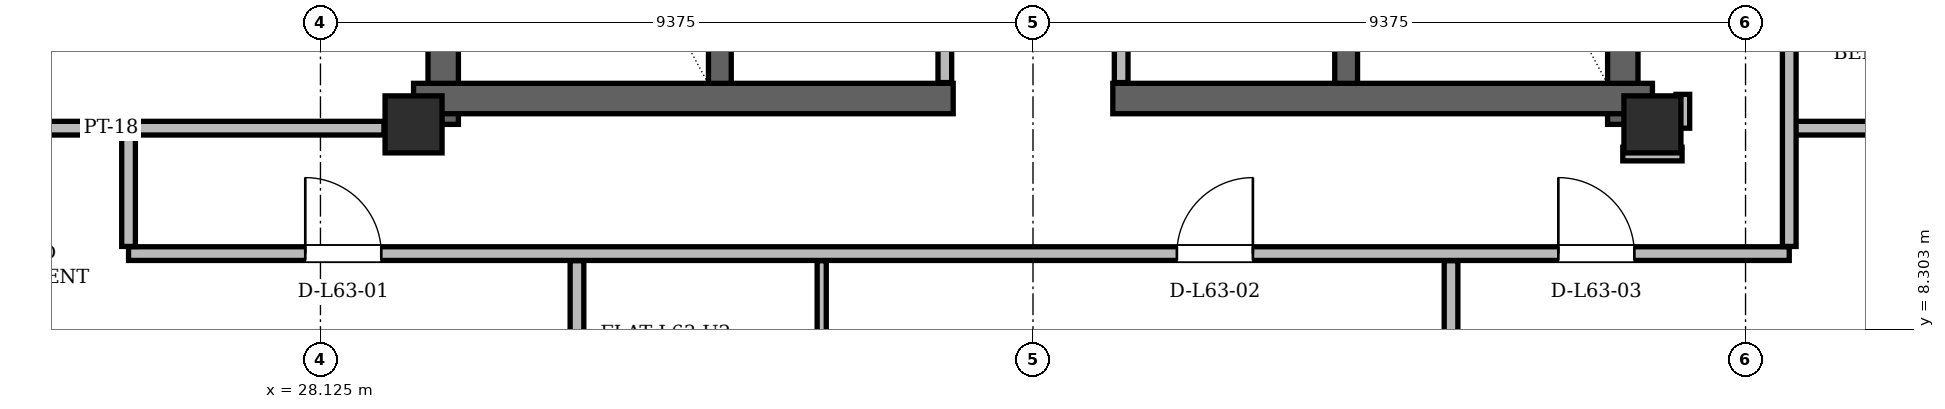
"""IFC4 building model, lengths in metres.
Left out: names, types, materials, properties, quantities, classifications, styles, units other than length and angle.
Written with IfcOpenShell. Run it as: python <this file> out.ifc"""

import sys

from ifc_helpers import new_model, si_unit, direction, frame, frame_2d, origin, origin_2d, place, context, subcontext, project, spatial, rectangle, hollow_rectangle, extrude, element, fill, save


model = new_model("IFC4")
c1 = context("Model", 3, precision=1e-05, world=origin(), true_north=direction((0.0, 1.0)))
c2 = subcontext(c1, "Body", "Model", "MODEL_VIEW")
j1 = project(units=[si_unit("LENGTHUNIT", "METRE"), si_unit("PLANEANGLEUNIT", "RADIAN")], contexts=[c1])
p1 = place(None, origin())
s1 = spatial("IfcSite", under=j1, at=p1, CompositionType="ELEMENT")
p2 = place(p1, origin())
s2 = spatial("IfcBuilding", under=s1, at=p2, CompositionType="ELEMENT")
p3 = place(p2, frame((0.0, 0.0, 237.9)))
s3 = spatial("IfcBuildingStorey", under=s2, at=p3, CompositionType="ELEMENT", Elevation=237.9)
for number, where, z_axis, x_axis in (
    (1, (29.35, 11.0, 0.0), (0.0, 0.0, 1.0), (1.0, 0.0, 0.0)),
    (2, (45.65, 11.0, 0.0), (0.0, 0.0, 1.0), (1.0, 0.0, 0.0)),
):
    element("IfcColumn", number, at=place(p3, frame(where, z_axis=z_axis, x_axis=x_axis)), inside=s3, PredefinedType="COLUMN", context=c2, shape_type="SweptSolid", body=[
        extrude(hollow_rectangle(XDim=0.75, YDim=0.75, WallThickness=0.06, at=origin_2d()), origin(), (0.0, 0.0, 1.0), 3.6),
    ])
for number, where, z_axis, x_axis in (
    (3, (29.74, 11.0, 0.0), (0.0, 0.0, 1.0), (0.0, 1.0, 0.0)),
    (4, (45.26, 11.0, 0.0), (0.0, 0.0, 1.0), (0.0, 1.0, 0.0)),
):
    element("IfcWall", number, at=place(p3, frame(where, z_axis=z_axis, x_axis=x_axis)), inside=s3, PredefinedType="SHEAR", context=c2, shape_type="SweptSolid", body=[
        extrude(rectangle(XDim=13.3, YDim=0.4, at=frame_2d((6.65, 0.0))), origin(), (0.0, 0.0, 1.0), 3.38),
    ])
for number, where, z_axis, x_axis in (
    (5, (29.35, 11.34, 0.0), (0.0, 0.0, 1.0), (1.0, 0.0, 0.0)),
    (6, (38.55, 11.34, 0.0), (0.0, 0.0, 1.0), (1.0, 0.0, 0.0)),
):
    element("IfcWall", number, at=place(p3, frame(where, z_axis=z_axis, x_axis=x_axis)), inside=s3, PredefinedType="SHEAR", context=c2, shape_type="SweptSolid", body=[
        extrude(rectangle(XDim=7.1, YDim=0.4, at=frame_2d((3.55, 0.0))), origin(), (0.0, 0.0, 1.0), 3.38),
    ])
for number, where, z_axis, x_axis in (
    (7, (33.38, 11.54, 0.0), (0.0, 0.0, 1.0), (0.0, 1.0, 0.0)),
    (8, (41.62, 11.54, 0.0), (0.0, 0.0, 1.0), (0.0, 1.0, 0.0)),
):
    element("IfcWall", number, at=place(p3, frame(where, z_axis=z_axis, x_axis=x_axis)), inside=s3, PredefinedType="SHEAR", context=c2, shape_type="SweptSolid", body=[
        extrude(rectangle(XDim=7.62, YDim=0.3, at=frame_2d((3.81, 0.0))), origin(), (0.0, 0.0, 1.0), 3.38),
    ])
p4 = place(p3, frame((58.899, 11.151, 0.0), z_axis=(0.0, 0.0, 1.0), x_axis=(-0.500002325133, 0.866024061364, 0.0)))
e9 = element("IfcWall", 9, at=p4, inside=s3, PredefinedType="SOLIDWALL", context=c2, shape_type="SweptSolid", body=[
    extrude(rectangle(XDim=36.9, YDim=0.29, at=frame_2d((18.45, 0.0))), origin(), (0.0, 0.0, 1.0), 2.677),
])
p5 = place(p4, frame((3.429, 0.0, 0.0)))
e10 = element("IfcOpeningElement", 10, at=p5, cuts=e9, PredefinedType="OPENING", context=c2, shape_type="SweptSolid", body=[
    extrude(rectangle(XDim=1.5, YDim=2.2, at=frame_2d((0.75, 1.1))), frame((0.0, 0.145, 0.0), z_axis=(0.0, -1.0, 0.0), x_axis=(1.0, 0.0, 0.0)), (0.0, 0.0, 1.0), 0.29),
])
p6 = place(p4, frame((27.156, 0.0, 0.0)))
e11 = element("IfcOpeningElement", 11, at=p6, cuts=e9, PredefinedType="OPENING", context=c2, shape_type="SweptSolid", body=[
    extrude(rectangle(XDim=1.5, YDim=2.2, at=frame_2d((0.75, 1.1))), frame((0.0, 0.145, 0.0), z_axis=(0.0, -1.0, 0.0), x_axis=(1.0, 0.0, 0.0)), (0.0, 0.0, 1.0), 0.29),
])
p7 = place(p4, frame((6.97, 0.0, 0.85)))
e12 = element("IfcOpeningElement", 12, at=p7, cuts=e9, PredefinedType="OPENING", context=c2, shape_type="SweptSolid", body=[
    extrude(rectangle(XDim=1.6, YDim=1.7, at=frame_2d((0.8, 0.85))), frame((0.0, 0.145, 0.0), z_axis=(0.0, -1.0, 0.0), x_axis=(1.0, 0.0, 0.0)), (0.0, 0.0, 1.0), 0.29),
])
p8 = place(p4, frame((1.106, 0.0, 0.85)))
e13 = element("IfcOpeningElement", 13, at=p8, cuts=e9, PredefinedType="OPENING", context=c2, shape_type="SweptSolid", body=[
    extrude(rectangle(XDim=1.6, YDim=1.7, at=frame_2d((0.8, 0.85))), frame((0.0, 0.145, 0.0), z_axis=(0.0, -1.0, 0.0), x_axis=(1.0, 0.0, 0.0)), (0.0, 0.0, 1.0), 0.29),
])
p9 = place(p4, frame((34.697, 0.0, 0.85)))
e14 = element("IfcOpeningElement", 14, at=p9, cuts=e9, PredefinedType="OPENING", context=c2, shape_type="SweptSolid", body=[
    extrude(rectangle(XDim=1.2, YDim=1.48, at=frame_2d((0.6, 0.74))), frame((0.0, 0.145, 0.0), z_axis=(0.0, -1.0, 0.0), x_axis=(1.0, 0.0, 0.0)), (0.0, 0.0, 1.0), 0.29),
])
p10 = place(p4, frame((16.774, 0.0, 0.85)))
e15 = element("IfcOpeningElement", 15, at=p10, cuts=e9, PredefinedType="OPENING", context=c2, shape_type="SweptSolid", body=[
    extrude(rectangle(XDim=2.2, YDim=1.717, at=frame_2d((1.1, 0.858))), frame((0.0, 0.145, 0.0), z_axis=(0.0, -1.0, 0.0), x_axis=(1.0, 0.0, 0.0)), (0.0, 0.0, 1.0), 0.29),
])
p11 = place(p4, frame((22.799, 0.0, 0.85)))
e16 = element("IfcOpeningElement", 16, at=p11, cuts=e9, PredefinedType="OPENING", context=c2, shape_type="SweptSolid", body=[
    extrude(rectangle(XDim=1.6, YDim=1.7, at=frame_2d((0.8, 0.85))), frame((0.0, 0.145, 0.0), z_axis=(0.0, -1.0, 0.0), x_axis=(1.0, 0.0, 0.0)), (0.0, 0.0, 1.0), 0.29),
])
p12 = place(p4, frame((29.059, 0.0, 0.85)))
e17 = element("IfcOpeningElement", 17, at=p12, cuts=e9, PredefinedType="OPENING", context=c2, shape_type="SweptSolid", body=[
    extrude(rectangle(XDim=1.2, YDim=1.48, at=frame_2d((0.6, 0.74))), frame((0.0, 0.145, 0.0), z_axis=(0.0, -1.0, 0.0), x_axis=(1.0, 0.0, 0.0)), (0.0, 0.0, 1.0), 0.29),
])
p13 = place(p4, frame((31.635, 0.0, 0.85)))
e18 = element("IfcOpeningElement", 18, at=p13, cuts=e9, PredefinedType="OPENING", context=c2, shape_type="SweptSolid", body=[
    extrude(rectangle(XDim=1.2, YDim=1.48, at=frame_2d((0.6, 0.74))), frame((0.0, 0.145, 0.0), z_axis=(0.0, -1.0, 0.0), x_axis=(1.0, 0.0, 0.0)), (0.0, 0.0, 1.0), 0.29),
])
p14 = place(p4, frame((12.419, 0.0, 0.85)))
e19 = element("IfcOpeningElement", 19, at=p14, cuts=e9, PredefinedType="OPENING", context=c2, shape_type="SweptSolid", body=[
    extrude(rectangle(XDim=1.2, YDim=1.48, at=frame_2d((0.6, 0.74))), frame((0.0, 0.145, 0.0), z_axis=(0.0, -1.0, 0.0), x_axis=(1.0, 0.0, 0.0)), (0.0, 0.0, 1.0), 0.29),
])
p15 = place(p3, frame((34.551, 43.107, 0.0), z_axis=(0.0, 0.0, 1.0), x_axis=(-0.500002325133, -0.866024061364, 0.0)))
e20 = element("IfcWall", 20, at=p15, inside=s3, PredefinedType="SOLIDWALL", context=c2, shape_type="SweptSolid", body=[
    extrude(rectangle(XDim=36.9, YDim=0.29, at=frame_2d((18.45, 0.0))), origin(), (0.0, 0.0, 1.0), 2.677),
])
p16 = place(p15, frame((3.429, 0.0, 0.0)))
e21 = element("IfcOpeningElement", 21, at=p16, cuts=e20, PredefinedType="OPENING", context=c2, shape_type="SweptSolid", body=[
    extrude(rectangle(XDim=1.5, YDim=2.2, at=frame_2d((0.75, 1.1))), frame((0.0, 0.145, 0.0), z_axis=(0.0, -1.0, 0.0), x_axis=(1.0, 0.0, 0.0)), (0.0, 0.0, 1.0), 0.29),
])
p17 = place(p15, frame((28.625, 0.0, 0.0)))
e22 = element("IfcOpeningElement", 22, at=p17, cuts=e20, PredefinedType="OPENING", context=c2, shape_type="SweptSolid", body=[
    extrude(rectangle(XDim=1.5, YDim=2.2, at=frame_2d((0.75, 1.1))), frame((0.0, 0.145, 0.0), z_axis=(0.0, -1.0, 0.0), x_axis=(1.0, 0.0, 0.0)), (0.0, 0.0, 1.0), 0.29),
])
p18 = place(p15, frame((21.887, 0.0, 0.85)))
e23 = element("IfcOpeningElement", 23, at=p18, cuts=e20, PredefinedType="OPENING", context=c2, shape_type="SweptSolid", body=[
    extrude(rectangle(XDim=2.4, YDim=1.717, at=frame_2d((1.2, 0.858))), frame((0.0, 0.145, 0.0), z_axis=(0.0, -1.0, 0.0), x_axis=(1.0, 0.0, 0.0)), (0.0, 0.0, 1.0), 0.29),
])
p19 = place(p15, frame((34.716, 0.0, 0.85)))
e24 = element("IfcOpeningElement", 24, at=p19, cuts=e20, PredefinedType="OPENING", context=c2, shape_type="SweptSolid", body=[
    extrude(rectangle(XDim=1.2, YDim=1.48, at=frame_2d((0.6, 0.74))), frame((0.0, 0.145, 0.0), z_axis=(0.0, -1.0, 0.0), x_axis=(1.0, 0.0, 0.0)), (0.0, 0.0, 1.0), 0.29),
])
p20 = place(p15, frame((32.59, 0.0, 0.85)))
e25 = element("IfcOpeningElement", 25, at=p20, cuts=e20, PredefinedType="OPENING", context=c2, shape_type="SweptSolid", body=[
    extrude(rectangle(XDim=1.2, YDim=1.48, at=frame_2d((0.6, 0.74))), frame((0.0, 0.145, 0.0), z_axis=(0.0, -1.0, 0.0), x_axis=(1.0, 0.0, 0.0)), (0.0, 0.0, 1.0), 0.29),
])
p21 = place(p15, frame((12.187, 0.0, 0.85)))
e26 = element("IfcOpeningElement", 26, at=p21, cuts=e20, PredefinedType="OPENING", context=c2, shape_type="SweptSolid", body=[
    extrude(rectangle(XDim=1.2, YDim=1.48, at=frame_2d((0.6, 0.74))), frame((0.0, 0.145, 0.0), z_axis=(0.0, -1.0, 0.0), x_axis=(1.0, 0.0, 0.0)), (0.0, 0.0, 1.0), 0.29),
])
p22 = place(p15, frame((16.565, 0.0, 0.85)))
e27 = element("IfcOpeningElement", 27, at=p22, cuts=e20, PredefinedType="OPENING", context=c2, shape_type="SweptSolid", body=[
    extrude(rectangle(XDim=2.0, YDim=1.717, at=frame_2d((1.0, 0.858))), frame((0.0, 0.145, 0.0), z_axis=(0.0, -1.0, 0.0), x_axis=(1.0, 0.0, 0.0)), (0.0, 0.0, 1.0), 0.29),
])
p23 = place(p15, frame((6.94, 0.0, 0.85)))
e28 = element("IfcOpeningElement", 28, at=p23, cuts=e20, PredefinedType="OPENING", context=c2, shape_type="SweptSolid", body=[
    extrude(rectangle(XDim=1.2, YDim=1.48, at=frame_2d((0.6, 0.74))), frame((0.0, 0.145, 0.0), z_axis=(0.0, -1.0, 0.0), x_axis=(1.0, 0.0, 0.0)), (0.0, 0.0, 1.0), 0.29),
])
p24 = place(p3, frame((36.34, 11.55, 0.0), z_axis=(0.0, 0.0, 1.0), x_axis=(0.0, 1.0, 0.0)))
e29 = element("IfcWall", 29, at=p24, inside=s3, PredefinedType="PARTITIONING", context=c2, shape_type="SweptSolid", body=[
    extrude(rectangle(XDim=5.55, YDim=0.18, at=frame_2d((2.775, 0.0))), origin(), (0.0, 0.0, 1.0), 3.38),
])
p25 = place(p24, frame((0.55, 0.0, 0.0)))
e30 = element("IfcOpeningElement", 30, at=p25, cuts=e29, PredefinedType="OPENING", context=c2, shape_type="SweptSolid", body=[
    extrude(rectangle(XDim=0.88, YDim=2.08, at=frame_2d((0.44, 1.04))), frame((0.0, 0.09, 0.0), z_axis=(0.0, -1.0, 0.0), x_axis=(1.0, 0.0, 0.0)), (0.0, 0.0, 1.0), 0.18),
])
p26 = place(p24, frame((3.25, 0.0, 0.0)))
e31 = element("IfcOpeningElement", 31, at=p26, cuts=e29, PredefinedType="OPENING", context=c2, shape_type="SweptSolid", body=[
    extrude(rectangle(XDim=0.88, YDim=2.08, at=frame_2d((0.44, 1.04))), frame((0.0, 0.09, 0.0), z_axis=(0.0, -1.0, 0.0), x_axis=(1.0, 0.0, 0.0)), (0.0, 0.0, 1.0), 0.18),
])
p27 = place(p3, frame((38.66, 11.55, 0.0), z_axis=(0.0, 0.0, 1.0), x_axis=(0.0, 1.0, 0.0)))
e32 = element("IfcWall", 32, at=p27, inside=s3, PredefinedType="PARTITIONING", context=c2, shape_type="SweptSolid", body=[
    extrude(rectangle(XDim=5.55, YDim=0.18, at=frame_2d((2.775, 0.0))), origin(), (0.0, 0.0, 1.0), 3.38),
])
p28 = place(p27, frame((1.35, 0.0, 0.0)))
e33 = element("IfcOpeningElement", 33, at=p28, cuts=e32, PredefinedType="OPENING", context=c2, shape_type="SweptSolid", body=[
    extrude(rectangle(XDim=0.88, YDim=2.08, at=frame_2d((0.44, 1.04))), frame((0.0, 0.09, 0.0), z_axis=(0.0, -1.0, 0.0), x_axis=(1.0, 0.0, 0.0)), (0.0, 0.0, 1.0), 0.18),
])
p29 = place(p27, frame((4.1, 0.0, 0.0)))
e34 = element("IfcOpeningElement", 34, at=p29, cuts=e32, PredefinedType="OPENING", context=c2, shape_type="SweptSolid", body=[
    extrude(rectangle(XDim=0.88, YDim=2.08, at=frame_2d((0.44, 1.04))), frame((0.0, 0.09, 0.0), z_axis=(0.0, -1.0, 0.0), x_axis=(1.0, 0.0, 0.0)), (0.0, 0.0, 1.0), 0.18),
])
p30 = place(p3, frame((25.6, 9.3, 0.0), z_axis=(0.0, 0.0, 1.0), x_axis=(1.0, 0.0, 0.0)))
e35 = element("IfcWall", 35, at=p30, inside=s3, PredefinedType="PARTITIONING", context=c2, shape_type="SweptSolid", body=[
    extrude(rectangle(XDim=21.85, YDim=0.18, at=frame_2d((10.925, 0.0))), origin(), (0.0, 0.0, 1.0), 2.913),
])
p31 = place(p30, frame((2.325, 0.0, 0.0)))
e36 = element("IfcOpeningElement", 36, at=p31, cuts=e35, PredefinedType="OPENING", context=c2, shape_type="SweptSolid", body=[
    extrude(rectangle(XDim=1.0, YDim=2.18, at=frame_2d((0.5, 1.09))), frame((0.0, 0.09, 0.0), z_axis=(0.0, -1.0, 0.0), x_axis=(1.0, 0.0, 0.0)), (0.0, 0.0, 1.0), 0.18),
])
p32 = place(p30, frame((13.793, 0.0, 0.0)))
e37 = element("IfcOpeningElement", 37, at=p32, cuts=e35, PredefinedType="OPENING", context=c2, shape_type="SweptSolid", body=[
    extrude(rectangle(XDim=1.0, YDim=2.18, at=frame_2d((0.5, 1.09))), frame((0.0, 0.09, 0.0), z_axis=(0.0, -1.0, 0.0), x_axis=(1.0, 0.0, 0.0)), (0.0, 0.0, 1.0), 0.18),
])
p33 = place(p30, frame((18.812, 0.0, 0.0)))
e38 = element("IfcOpeningElement", 38, at=p33, cuts=e35, PredefinedType="OPENING", context=c2, shape_type="SweptSolid", body=[
    extrude(rectangle(XDim=1.0, YDim=2.18, at=frame_2d((0.5, 1.09))), frame((0.0, 0.09, 0.0), z_axis=(0.0, -1.0, 0.0), x_axis=(1.0, 0.0, 0.0)), (0.0, 0.0, 1.0), 0.18),
])
p34 = place(p3, frame((45.26, 10.61, 0.0), z_axis=(0.0, 0.0, 1.0), x_axis=(1.0, 0.0, 0.0)))
e39 = element("IfcWall", 39, at=p34, inside=s3, PredefinedType="PARTITIONING", context=c2, shape_type="SweptSolid", body=[
    extrude(rectangle(XDim=0.78, YDim=0.18, at=frame_2d((0.39, 0.0))), origin(), (0.0, 0.0, 1.0), 3.38),
])
p35 = place(p3, frame((16.487, 10.95, 0.0), z_axis=(0.0, 0.0, 1.0), x_axis=(1.0, 0.0, 0.0)))
e40 = element("IfcWall", 40, at=p35, inside=s3, PredefinedType="PARTITIONING", context=c2, shape_type="SweptSolid", body=[
    extrude(rectangle(XDim=12.473, YDim=0.18, at=frame_2d((6.237, 0.0))), origin(), (0.0, 0.0, 1.0), 2.913),
])
p36 = place(p3, frame((47.45, 10.95, 0.0), z_axis=(0.0, 0.0, 1.0), x_axis=(1.0, 0.0, 0.0)))
e41 = element("IfcWall", 41, at=p36, inside=s3, PredefinedType="PARTITIONING", context=c2, shape_type="SweptSolid", body=[
    extrude(rectangle(XDim=11.063, YDim=0.18, at=frame_2d((5.532, 0.0))), origin(), (0.0, 0.0, 1.0), 2.913),
])
p37 = place(p3, frame((25.6, 9.394, 0.0), z_axis=(0.0, 0.0, 1.0), x_axis=(0.0, 1.0, 0.0)))
e42 = element("IfcWall", 42, at=p37, inside=s3, PredefinedType="PARTITIONING", context=c2, shape_type="SweptSolid", body=[
    extrude(rectangle(XDim=1.462, YDim=0.18, at=frame_2d((0.731, 0.0))), origin(), (0.0, 0.0, 1.0), 3.38),
])
p38 = place(p3, frame((31.5, 6.191, 0.0), z_axis=(0.0, 0.0, 1.0), x_axis=(0.0, 1.0, 0.0)))
e43 = element("IfcWall", 43, at=p38, inside=s3, PredefinedType="PARTITIONING", context=c2, shape_type="SweptSolid", body=[
    extrude(rectangle(XDim=3.015, YDim=0.18, at=frame_2d((1.507, 0.0))), origin(), (0.0, 0.0, 1.0), 2.966),
])
p39 = place(p3, frame((34.72, 6.191, 0.0), z_axis=(0.0, 0.0, 1.0), x_axis=(0.0, 1.0, 0.0)))
e44 = element("IfcWall", 44, at=p39, inside=s3, PredefinedType="PARTITIONING", context=c2, shape_type="SweptSolid", body=[
    extrude(rectangle(XDim=3.015, YDim=0.12, at=frame_2d((1.507, 0.0))), origin(), (0.0, 0.0, 1.0), 3.38),
])
p40 = place(p39, frame((1.115, 0.0, 0.0)))
e45 = element("IfcOpeningElement", 45, at=p40, cuts=e44, PredefinedType="OPENING", context=c2, shape_type="SweptSolid", body=[
    extrude(rectangle(XDim=0.88, YDim=2.08, at=frame_2d((0.44, 1.04))), frame((0.0, 0.06, 0.0), z_axis=(0.0, -1.0, 0.0), x_axis=(1.0, 0.0, 0.0)), (0.0, 0.0, 1.0), 0.12),
])
p41 = place(p3, frame((43.0, 6.191, 0.0), z_axis=(0.0, 0.0, 1.0), x_axis=(0.0, 1.0, 0.0)))
e46 = element("IfcWall", 46, at=p41, inside=s3, PredefinedType="PARTITIONING", context=c2, shape_type="SweptSolid", body=[
    extrude(rectangle(XDim=3.015, YDim=0.18, at=frame_2d((1.507, 0.0))), origin(), (0.0, 0.0, 1.0), 3.38),
])
p42 = place(p3, frame((46.05, 10.95, 0.0), z_axis=(0.0, 0.0, 1.0), x_axis=(0.0, 1.0, 0.0)))
e47 = element("IfcWall", 47, at=p42, inside=s3, PredefinedType="PARTITIONING", context=c2, shape_type="SweptSolid", body=[
    extrude(rectangle(XDim=0.445, YDim=0.18, at=frame_2d((0.223, 0.0))), origin(), (0.0, 0.0, 1.0), 2.913),
])
p43 = place(p3, frame((47.45, 9.394, 0.0), z_axis=(0.0, 0.0, 1.0), x_axis=(0.0, 1.0, 0.0)))
e48 = element("IfcWall", 48, at=p43, inside=s3, PredefinedType="PARTITIONING", context=c2, shape_type="SweptSolid", body=[
    extrude(rectangle(XDim=16.482, YDim=0.18, at=frame_2d((8.241, 0.0))), origin(), (0.0, 0.0, 1.0), 2.913),
])
p44 = place(p43, frame((6.247, 0.0, 0.0)))
e49 = element("IfcOpeningElement", 49, at=p44, cuts=e48, PredefinedType="OPENING", context=c2, shape_type="SweptSolid", body=[
    extrude(rectangle(XDim=1.0, YDim=2.18, at=frame_2d((0.5, 1.09))), frame((0.0, 0.09, 0.0), z_axis=(0.0, -1.0, 0.0), x_axis=(1.0, 0.0, 0.0)), (0.0, 0.0, 1.0), 0.18),
])
p45 = place(p43, frame((10.379, 0.0, 0.0)))
e50 = element("IfcOpeningElement", 50, at=p45, cuts=e48, PredefinedType="OPENING", context=c2, shape_type="SweptSolid", body=[
    extrude(rectangle(XDim=1.0, YDim=2.18, at=frame_2d((0.5, 1.09))), frame((0.0, 0.09, 0.0), z_axis=(0.0, -1.0, 0.0), x_axis=(1.0, 0.0, 0.0)), (0.0, 0.0, 1.0), 0.18),
])
p46 = place(p31, origin())
e51 = element("IfcDoor", 51, at=p46, inside=s3, OperationType="SINGLE_SWING_LEFT", PredefinedType="DOOR", context=c2, shape_type="SweptSolid", body=[
    extrude(rectangle(XDim=1.0, YDim=2.18, at=frame_2d((0.5, 1.09))), frame((0.0, 0.025, 0.0), z_axis=(0.0, -1.0, 0.0), x_axis=(1.0, 0.0, 0.0)), (0.0, 0.0, 1.0), 0.05),
])
fill(e36, e51)
p47 = place(p32, origin())
e52 = element("IfcDoor", 52, at=p47, inside=s3, OperationType="SINGLE_SWING_RIGHT", PredefinedType="DOOR", context=c2, shape_type="SweptSolid", body=[
    extrude(rectangle(XDim=1.0, YDim=2.18, at=frame_2d((0.5, 1.09))), frame((0.0, 0.025, 0.0), z_axis=(0.0, -1.0, 0.0), x_axis=(1.0, 0.0, 0.0)), (0.0, 0.0, 1.0), 0.05),
])
fill(e37, e52)
p48 = place(p33, origin())
e53 = element("IfcDoor", 53, at=p48, inside=s3, OperationType="SINGLE_SWING_LEFT", PredefinedType="DOOR", context=c2, shape_type="SweptSolid", body=[
    extrude(rectangle(XDim=1.0, YDim=2.18, at=frame_2d((0.5, 1.09))), frame((0.0, 0.025, 0.0), z_axis=(0.0, -1.0, 0.0), x_axis=(1.0, 0.0, 0.0)), (0.0, 0.0, 1.0), 0.05),
])
fill(e38, e53)
save(model, sys.argv[1])
